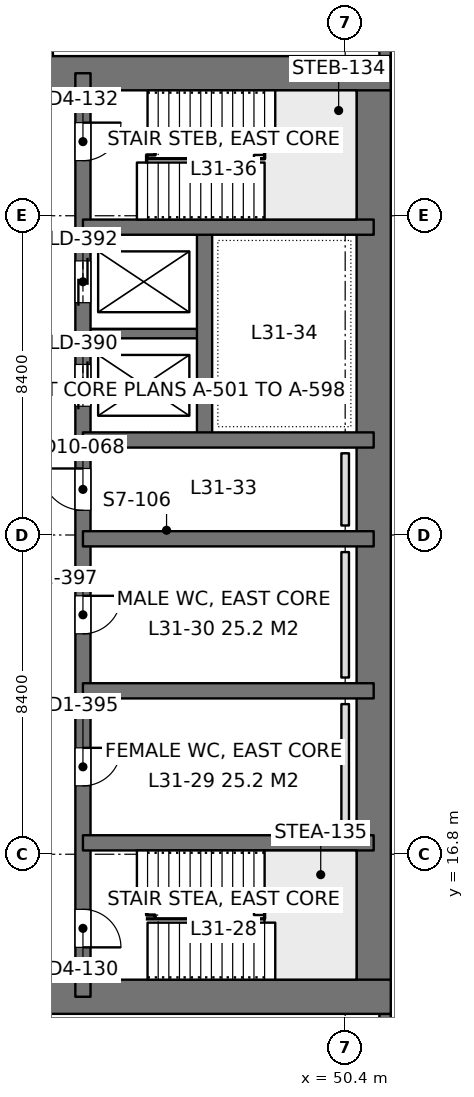
"""IFC4 building model, lengths in metres.
Left out: names, types, materials, properties, quantities, classifications, styles, units other than length and angle.
Written with IfcOpenShell. Run it as: python <this file> out.ifc"""

import sys

from ifc_helpers import new_model, si_unit, direction, frame, frame_2d, origin, place, context, subcontext, project, spatial, rectangle, extrude, element, fill, save


model = new_model("IFC4")
c1 = context("Model", 3, precision=1e-05, world=origin(), true_north=direction((0.0, 1.0)))
c2 = subcontext(c1, "Body", "Model", "MODEL_VIEW")
j1 = project(units=[si_unit("LENGTHUNIT", "METRE"), si_unit("PLANEANGLEUNIT", "RADIAN")], contexts=[c1])
p1 = place(None, origin())
s1 = spatial("IfcSite", under=j1, at=p1, CompositionType="ELEMENT")
p2 = place(p1, origin())
s2 = spatial("IfcBuilding", under=s1, at=p2, CompositionType="ELEMENT")
p3 = place(p2, frame((0.0, 0.0, 138.6)))
s3 = spatial("IfcBuildingStorey", under=s2, at=p3, CompositionType="ELEMENT", Elevation=138.6)
p4 = place(p3, frame((33.6, 13.05, 0.0), z_axis=(0.0, 0.0, 1.0), x_axis=(1.0, 0.0, 0.0)))
e1 = element("IfcWall", 1, at=p4, inside=s3, PredefinedType="SHEAR", context=c2, shape_type="SweptSolid", body=[
    extrude(rectangle(XDim=18.0, YDim=0.9, at=frame_2d((9.0, 0.0))), origin(), (0.0, 0.0, 1.0), 4.2),
])
p5 = place(p4, frame((7.25, 0.0, 0.0)))
e2 = element("IfcOpeningElement", 2, at=p5, cuts=e1, PredefinedType="OPENING", context=c2, shape_type="SweptSolid", body=[
    extrude(rectangle(XDim=1.8, YDim=2.4, at=frame_2d((0.9, 1.2))), frame((0.0, 0.46, 0.0), z_axis=(0.0, -1.0, 0.0), x_axis=(1.0, 0.0, 0.0)), (0.0, 0.0, 1.0), 0.92),
])
p6 = place(p3, frame((33.6, 37.35, 0.0), z_axis=(0.0, 0.0, 1.0), x_axis=(1.0, 0.0, 0.0)))
e3 = element("IfcWall", 3, at=p6, inside=s3, PredefinedType="SHEAR", context=c2, shape_type="SweptSolid", body=[
    extrude(rectangle(XDim=18.0, YDim=0.9, at=frame_2d((9.0, 0.0))), origin(), (0.0, 0.0, 1.0), 4.2),
])
p7 = place(p6, frame((7.25, 0.0, 0.0)))
e4 = element("IfcOpeningElement", 4, at=p7, cuts=e3, PredefinedType="OPENING", context=c2, shape_type="SweptSolid", body=[
    extrude(rectangle(XDim=1.8, YDim=2.4, at=frame_2d((0.9, 1.2))), frame((0.0, 0.46, 0.0), z_axis=(0.0, -1.0, 0.0), x_axis=(1.0, 0.0, 0.0)), (0.0, 0.0, 1.0), 0.92),
])
p8 = place(p3, frame((51.15, 13.05, 0.0), z_axis=(0.0, 0.0, 1.0), x_axis=(0.0, 1.0, 0.0)))
e5 = element("IfcWall", 5, at=p8, inside=s3, PredefinedType="SHEAR", context=c2, shape_type="SweptSolid", body=[
    extrude(rectangle(XDim=24.3, YDim=0.9, at=frame_2d((12.15, 0.0))), origin(), (0.0, 0.0, 1.0), 4.2),
])
p9 = place(p3, frame((43.5, 13.05, 0.0), z_axis=(0.0, 0.0, 1.0), x_axis=(0.0, 1.0, 0.0)))
e6 = element("IfcWall", 6, at=p9, inside=s3, PredefinedType="SHEAR", context=c2, shape_type="SweptSolid", body=[
    extrude(rectangle(XDim=24.3, YDim=0.4, at=frame_2d((12.15, 0.0))), origin(), (0.0, 0.0, 1.0), 4.2),
])
p10 = place(p9, frame((1.3, 0.0, 0.0)))
e7 = element("IfcOpeningElement", 7, at=p10, cuts=e6, PredefinedType="OPENING", context=c2, shape_type="SweptSolid", body=[
    extrude(rectangle(XDim=1.0, YDim=2.2, at=frame_2d((0.5, 1.1))), frame((0.0, 0.21, 0.0), z_axis=(0.0, -1.0, 0.0), x_axis=(1.0, 0.0, 0.0)), (0.0, 0.0, 1.0), 0.42),
])
p11 = place(p9, frame((22.0, 0.0, 0.0)))
e8 = element("IfcOpeningElement", 8, at=p11, cuts=e6, PredefinedType="OPENING", context=c2, shape_type="SweptSolid", body=[
    extrude(rectangle(XDim=1.0, YDim=2.2, at=frame_2d((0.5, 1.1))), frame((0.0, 0.21, 0.0), z_axis=(0.0, -1.0, 0.0), x_axis=(1.0, 0.0, 0.0)), (0.0, 0.0, 1.0), 0.42),
])
p12 = place(p9, frame((5.55, 0.0, 0.0)))
e9 = element("IfcOpeningElement", 9, at=p12, cuts=e6, PredefinedType="OPENING", context=c2, shape_type="SweptSolid", body=[
    extrude(rectangle(XDim=1.0, YDim=2.2, at=frame_2d((0.5, 1.1))), frame((0.0, 0.21, 0.0), z_axis=(0.0, -1.0, 0.0), x_axis=(1.0, 0.0, 0.0)), (0.0, 0.0, 1.0), 0.42),
])
p13 = place(p9, frame((9.55, 0.0, 0.0)))
e10 = element("IfcOpeningElement", 10, at=p13, cuts=e6, PredefinedType="OPENING", context=c2, shape_type="SweptSolid", body=[
    extrude(rectangle(XDim=1.0, YDim=2.2, at=frame_2d((0.5, 1.1))), frame((0.0, 0.21, 0.0), z_axis=(0.0, -1.0, 0.0), x_axis=(1.0, 0.0, 0.0)), (0.0, 0.0, 1.0), 0.42),
])
p14 = place(p9, frame((12.8, 0.0, 0.0)))
e11 = element("IfcOpeningElement", 11, at=p14, cuts=e6, PredefinedType="OPENING", context=c2, shape_type="SweptSolid", body=[
    extrude(rectangle(XDim=1.1, YDim=2.2, at=frame_2d((0.55, 1.1))), frame((0.0, 0.21, 0.0), z_axis=(0.0, -1.0, 0.0), x_axis=(1.0, 0.0, 0.0)), (0.0, 0.0, 1.0), 0.42),
])
p15 = place(p9, frame((15.538, 0.0, 0.0)))
e12 = element("IfcOpeningElement", 12, at=p15, cuts=e6, PredefinedType="OPENING", context=c2, shape_type="SweptSolid", body=[
    extrude(rectangle(XDim=1.1, YDim=2.2, at=frame_2d((0.55, 1.1))), frame((0.0, 0.21, 0.0), z_axis=(0.0, -1.0, 0.0), x_axis=(1.0, 0.0, 0.0)), (0.0, 0.0, 1.0), 0.42),
])
p16 = place(p9, frame((18.262, 0.0, 0.0)))
e13 = element("IfcOpeningElement", 13, at=p16, cuts=e6, PredefinedType="OPENING", context=c2, shape_type="SweptSolid", body=[
    extrude(rectangle(XDim=1.1, YDim=2.2, at=frame_2d((0.55, 1.1))), frame((0.0, 0.21, 0.0), z_axis=(0.0, -1.0, 0.0), x_axis=(1.0, 0.0, 0.0)), (0.0, 0.0, 1.0), 0.42),
])
for number, where, z_axis, x_axis in (
    (14, (51.15, 17.1, 0.0), (0.0, 0.0, 1.0), (-1.0, 0.0, 0.0)),
    (15, (51.15, 21.1, 0.0), (0.0, 0.0, 1.0), (-1.0, 0.0, 0.0)),
    (16, (51.15, 25.1, 0.0), (0.0, 0.0, 1.0), (-1.0, 0.0, 0.0)),
    (17, (51.15, 27.7, 0.0), (0.0, 0.0, 1.0), (-1.0, 0.0, 0.0)),
    (18, (51.15, 33.3, 0.0), (0.0, 0.0, 1.0), (-1.0, 0.0, 0.0)),
):
    element("IfcWall", number, at=place(p3, frame(where, z_axis=z_axis, x_axis=x_axis)), inside=s3, PredefinedType="SHEAR", context=c2, shape_type="SweptSolid", body=[
        extrude(rectangle(XDim=7.65, YDim=0.4, at=frame_2d((3.825, 0.0))), origin(), (0.0, 0.0, 1.0), 4.2),
    ])
p17 = place(p3, frame((46.7, 27.7, 0.0), z_axis=(0.0, 0.0, 1.0), x_axis=(0.0, 1.0, 0.0)))
e19 = element("IfcWall", 19, at=p17, inside=s3, PredefinedType="SHEAR", context=c2, shape_type="SweptSolid", body=[
    extrude(rectangle(XDim=5.6, YDim=0.4, at=frame_2d((2.8, 0.0))), origin(), (0.0, 0.0, 1.0), 4.2),
])
p18 = place(p3, frame((46.7, 30.5, 0.0), z_axis=(0.0, 0.0, 1.0), x_axis=(-1.0, 0.0, 0.0)))
e20 = element("IfcWall", 20, at=p18, inside=s3, PredefinedType="SHEAR", context=c2, shape_type="SweptSolid", body=[
    extrude(rectangle(XDim=3.2, YDim=0.25, at=frame_2d((1.6, 0.0))), origin(), (0.0, 0.0, 1.0), 4.2),
])
p19 = place(p3, frame((51.45, 42.0, 0.0), z_axis=(0.0, 0.0, 1.0), x_axis=(0.0, -1.0, 0.0)))
e21 = element("IfcWall", 21, at=p19, inside=s3, PredefinedType="SOLIDWALL", context=c2, shape_type="SweptSolid", body=[
    extrude(rectangle(XDim=4.2, YDim=0.3, at=frame_2d((2.1, 0.0))), origin(), (0.0, 0.0, 1.0), 4.05),
])
p20 = place(p19, frame((0.9, 0.0, 0.9)))
e22 = element("IfcOpeningElement", 22, at=p20, cuts=e21, PredefinedType="OPENING", context=c2, shape_type="SweptSolid", body=[
    extrude(rectangle(XDim=2.4, YDim=1.9, at=frame_2d((1.2, 0.95))), frame((0.0, 0.16, 0.0), z_axis=(0.0, -1.0, 0.0), x_axis=(1.0, 0.0, 0.0)), (0.0, 0.0, 1.0), 0.32),
])
p21 = place(p3, frame((51.45, 12.6, 0.0), z_axis=(0.0, 0.0, 1.0), x_axis=(0.0, -1.0, 0.0)))
e23 = element("IfcWall", 23, at=p21, inside=s3, PredefinedType="SOLIDWALL", context=c2, shape_type="SweptSolid", body=[
    extrude(rectangle(XDim=4.2, YDim=0.3, at=frame_2d((2.1, 0.0))), origin(), (0.0, 0.0, 1.0), 4.05),
])
p22 = place(p21, frame((0.9, 0.0, 0.9)))
e24 = element("IfcOpeningElement", 24, at=p22, cuts=e23, PredefinedType="OPENING", context=c2, shape_type="SweptSolid", body=[
    extrude(rectangle(XDim=2.4, YDim=1.9, at=frame_2d((1.2, 0.95))), frame((0.0, 0.16, 0.0), z_axis=(0.0, -1.0, 0.0), x_axis=(1.0, 0.0, 0.0)), (0.0, 0.0, 1.0), 0.32),
])
p23 = place(p3, frame((42.65, 37.8, 0.0), z_axis=(0.0, 0.0, 1.0), x_axis=(0.0, 1.0, 0.0)))
e25 = element("IfcWall", 25, at=p23, inside=s3, PredefinedType="PARTITIONING", context=c2, shape_type="SweptSolid", body=[
    extrude(rectangle(XDim=2.0, YDim=0.12, at=frame_2d((1.0, 0.0))), origin(), (0.0, 0.0, 1.0), 4.05),
])
for number, where, z_axis, x_axis in (
    (26, (50.4, 17.45, 0.0), (0.0, 0.0, 1.0), (0.0, 1.0, 0.0)),
    (27, (50.4, 21.45, 0.0), (0.0, 0.0, 1.0), (0.0, 1.0, 0.0)),
):
    element("IfcWall", number, at=place(p3, frame(where, z_axis=z_axis, x_axis=x_axis)), inside=s3, PredefinedType="PLUMBINGWALL", context=c2, shape_type="SweptSolid", body=[
        extrude(rectangle(XDim=3.3, YDim=0.2, at=frame_2d((1.65, 0.0))), origin(), (0.0, 0.0, 1.0), 1.2),
    ])
p24 = place(p3, frame((50.4, 25.45, 0.0), z_axis=(0.0, 0.0, 1.0), x_axis=(0.0, 1.0, 0.0)))
e28 = element("IfcWall", 28, at=p24, inside=s3, PredefinedType="PLUMBINGWALL", context=c2, shape_type="SweptSolid", body=[
    extrude(rectangle(XDim=1.9, YDim=0.2, at=frame_2d((0.95, 0.0))), origin(), (0.0, 0.0, 1.0), 1.2),
])
p25 = place(p10, frame((1.0, 0.0, 0.0), z_axis=(0.0, 0.0, 1.0), x_axis=(-1.0, 0.0, 0.0)))
e29 = element("IfcDoor", 29, at=p25, inside=s3, OperationType="SINGLE_SWING_RIGHT", PredefinedType="DOOR", context=c2, shape_type="SweptSolid", body=[
    extrude(rectangle(XDim=1.0, YDim=2.2, at=frame_2d((0.5, 1.1))), frame((0.0, 0.025, 0.0), z_axis=(0.0, -1.0, 0.0), x_axis=(1.0, 0.0, 0.0)), (0.0, 0.0, 1.0), 0.05),
])
fill(e7, e29)
p26 = place(p11, frame((1.0, 0.0, 0.0), z_axis=(0.0, 0.0, 1.0), x_axis=(-1.0, 0.0, 0.0)))
e30 = element("IfcDoor", 30, at=p26, inside=s3, OperationType="SINGLE_SWING_LEFT", PredefinedType="DOOR", context=c2, shape_type="SweptSolid", body=[
    extrude(rectangle(XDim=1.0, YDim=2.2, at=frame_2d((0.5, 1.1))), frame((0.0, 0.025, 0.0), z_axis=(0.0, -1.0, 0.0), x_axis=(1.0, 0.0, 0.0)), (0.0, 0.0, 1.0), 0.05),
])
fill(e8, e30)
p27 = place(p12, frame((1.0, 0.0, 0.0), z_axis=(0.0, 0.0, 1.0), x_axis=(-1.0, 0.0, 0.0)))
e31 = element("IfcDoor", 31, at=p27, inside=s3, OperationType="SINGLE_SWING_LEFT", PredefinedType="DOOR", context=c2, shape_type="SweptSolid", body=[
    extrude(rectangle(XDim=1.0, YDim=2.2, at=frame_2d((0.5, 1.1))), frame((0.0, 0.025, 0.0), z_axis=(0.0, -1.0, 0.0), x_axis=(1.0, 0.0, 0.0)), (0.0, 0.0, 1.0), 0.05),
])
fill(e9, e31)
p28 = place(p13, frame((1.0, 0.0, 0.0), z_axis=(0.0, 0.0, 1.0), x_axis=(-1.0, 0.0, 0.0)))
e32 = element("IfcDoor", 32, at=p28, inside=s3, OperationType="SINGLE_SWING_LEFT", PredefinedType="DOOR", context=c2, shape_type="SweptSolid", body=[
    extrude(rectangle(XDim=1.0, YDim=2.2, at=frame_2d((0.5, 1.1))), frame((0.0, 0.025, 0.0), z_axis=(0.0, -1.0, 0.0), x_axis=(1.0, 0.0, 0.0)), (0.0, 0.0, 1.0), 0.05),
])
fill(e10, e32)
p29 = place(p14, origin())
e33 = element("IfcDoor", 33, at=p29, inside=s3, OperationType="SINGLE_SWING_RIGHT", PredefinedType="DOOR", context=c2, shape_type="SweptSolid", body=[
    extrude(rectangle(XDim=1.1, YDim=2.2, at=frame_2d((0.55, 1.1))), frame((0.0, 0.025, 0.0), z_axis=(0.0, -1.0, 0.0), x_axis=(1.0, 0.0, 0.0)), (0.0, 0.0, 1.0), 0.05),
])
fill(e11, e33)
p30 = place(p15, origin())
e34 = element("IfcDoor", 34, at=p30, inside=s3, OperationType="DOUBLE_DOOR_SLIDING", PredefinedType="DOOR", context=c2, shape_type="SweptSolid", body=[
    extrude(rectangle(XDim=1.1, YDim=2.2, at=frame_2d((0.55, 1.1))), frame((0.0, 0.025, 0.0), z_axis=(0.0, -1.0, 0.0), x_axis=(1.0, 0.0, 0.0)), (0.0, 0.0, 1.0), 0.05),
])
fill(e12, e34)
p31 = place(p16, origin())
e35 = element("IfcDoor", 35, at=p31, inside=s3, OperationType="DOUBLE_DOOR_SLIDING", PredefinedType="DOOR", context=c2, shape_type="SweptSolid", body=[
    extrude(rectangle(XDim=1.1, YDim=2.2, at=frame_2d((0.55, 1.1))), frame((0.0, 0.025, 0.0), z_axis=(0.0, -1.0, 0.0), x_axis=(1.0, 0.0, 0.0)), (0.0, 0.0, 1.0), 0.05),
])
fill(e13, e35)
save(model, sys.argv[1])
